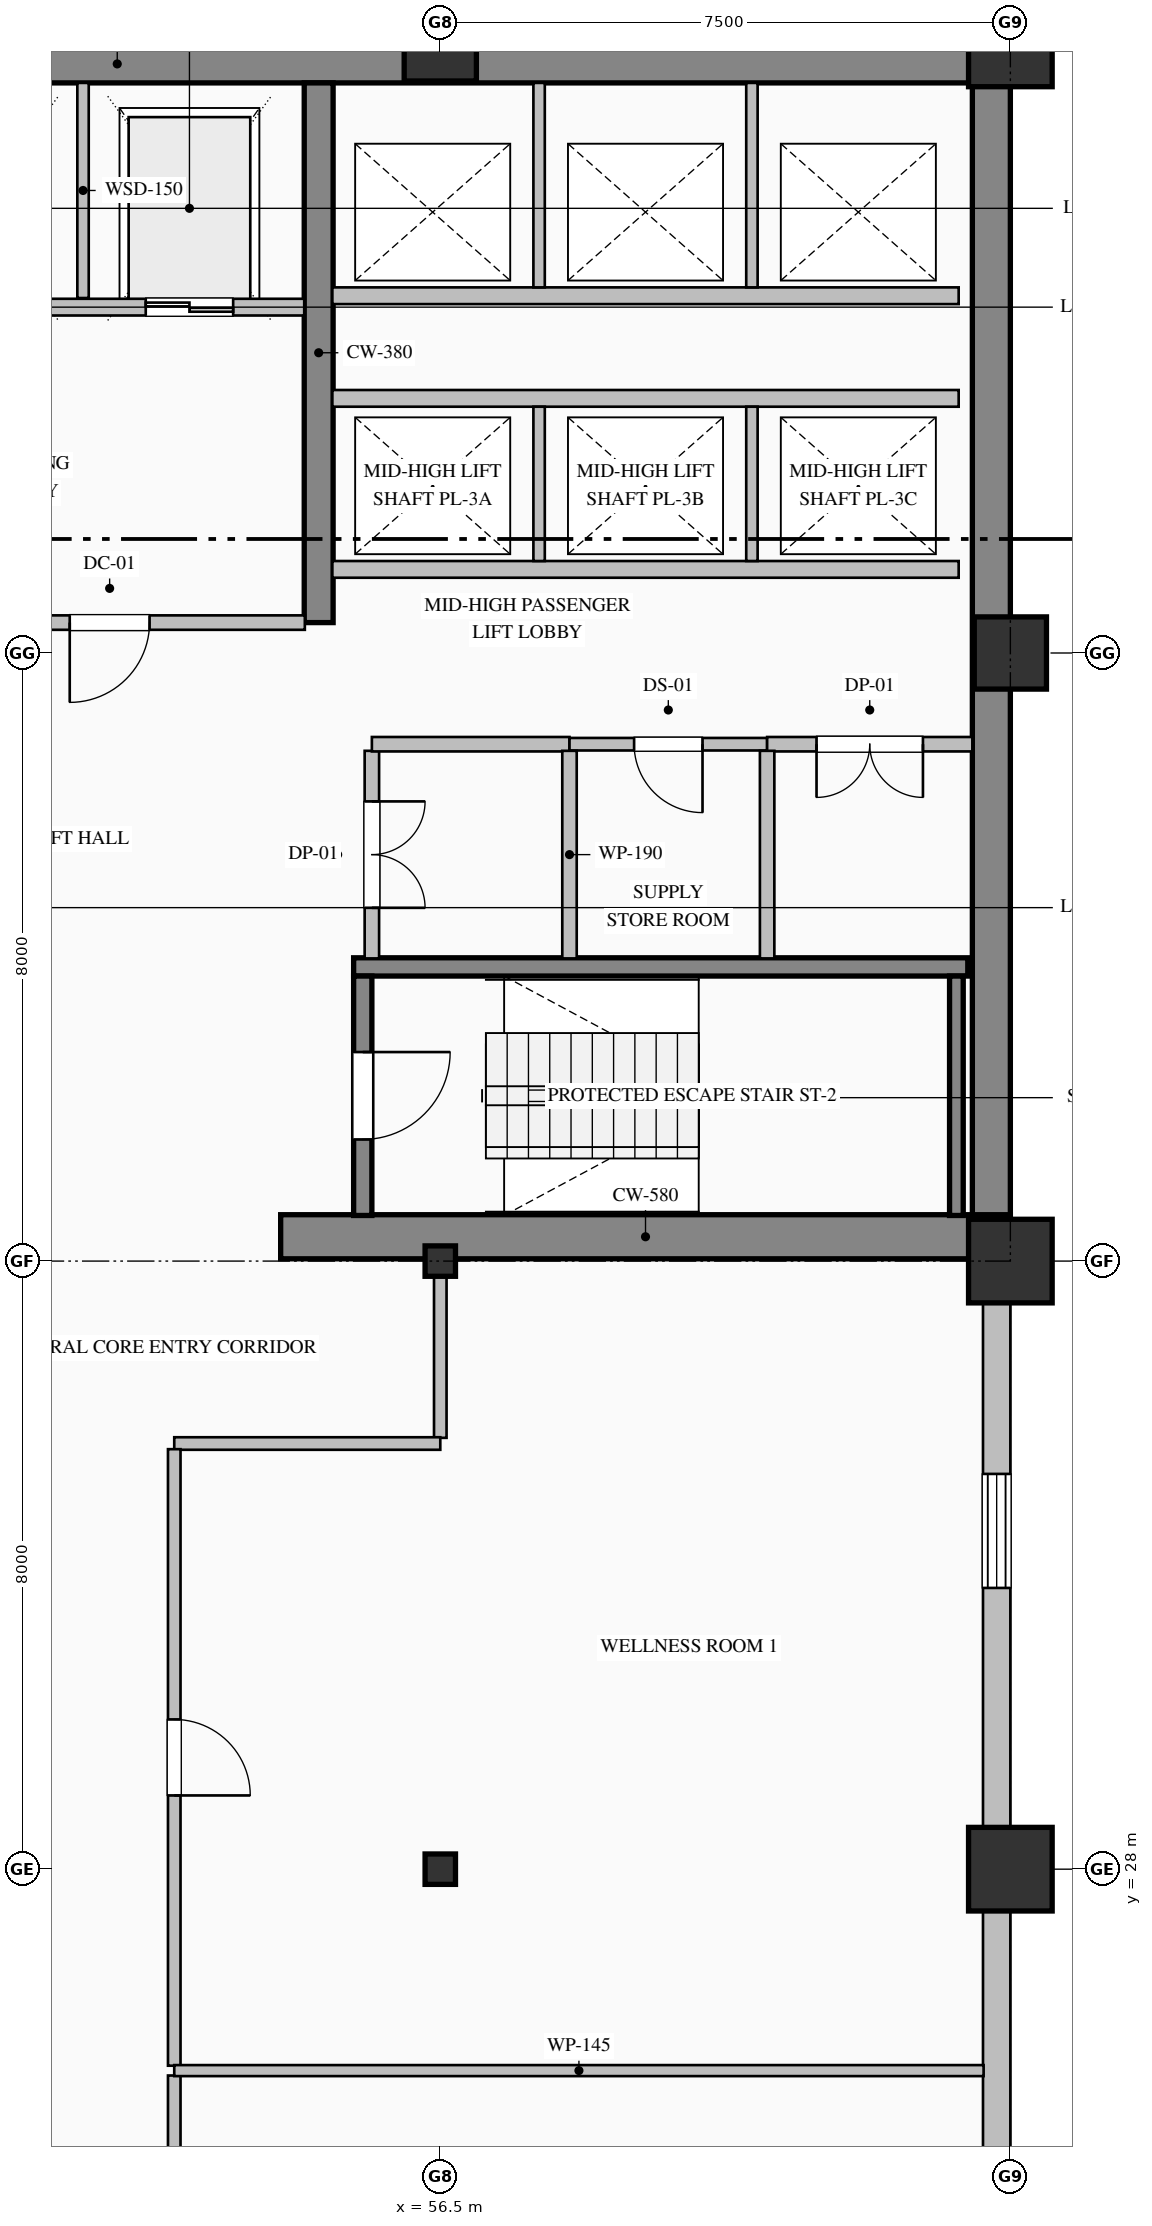
"""IFC4 building model, lengths in metres.
Left out: names, types, materials, properties, quantities, classifications, styles, units other than length and angle.
Written with IfcOpenShell. Run it as: python <this file> out.ifc"""

import sys

from ifc_helpers import new_model, si_unit, direction, frame, frame_2d, origin, origin_2d, place, context, subcontext, project, spatial, rectangle, hollow_rectangle, i_section, extrude, element, fill, save


model = new_model("IFC4")
c1 = context("Model", 3, precision=1e-05, world=origin(), true_north=direction((0.0, 1.0)))
c2 = subcontext(c1, "Body", "Model", "MODEL_VIEW")
j1 = project(units=[si_unit("LENGTHUNIT", "METRE"), si_unit("PLANEANGLEUNIT", "RADIAN")], contexts=[c1])
p1 = place(None, origin())
s1 = spatial("IfcSite", under=j1, at=p1, CompositionType="ELEMENT")
p2 = place(p1, origin())
s2 = spatial("IfcBuilding", under=s1, at=p2, CompositionType="ELEMENT")
p3 = place(p2, frame((0.0, 0.0, 175.0)))
s3 = spatial("IfcBuildingStorey", under=s2, at=p3, CompositionType="ELEMENT", Elevation=175.0)
p4 = place(p3, frame((40.5, 51.75, 0.0), z_axis=(0.0, 0.0, 1.0), x_axis=(1.0, 0.0, 0.0)))
e1 = element("IfcWall", 1, at=p4, inside=s3, PredefinedType="SHEAR", context=c2, shape_type="SweptSolid", body=[
    extrude(rectangle(XDim=23.5, YDim=0.5, at=frame_2d((11.75, 0.0))), origin(), (0.0, 0.0, 1.0), 3.765),
])
p5 = place(p3, frame((63.75, 36.32, 0.0), z_axis=(0.0, 0.0, 1.0), x_axis=(0.0, 1.0, 0.0)))
e2 = element("IfcWall", 2, at=p5, inside=s3, PredefinedType="SHEAR", context=c2, shape_type="SweptSolid", body=[
    extrude(rectangle(XDim=15.18, YDim=0.5, at=frame_2d((7.59, 0.0))), origin(), (0.0, 0.0, 1.0), 3.765),
])
p6 = place(p3, frame((54.4, 36.32, 0.0), z_axis=(0.0, 0.0, 1.0), x_axis=(1.0, 0.0, 0.0)))
e3 = element("IfcWall", 3, at=p6, inside=s3, PredefinedType="SHEAR", context=c2, shape_type="SweptSolid", body=[
    extrude(rectangle(XDim=9.6, YDim=0.58, at=frame_2d((4.8, 0.0))), origin(), (0.0, 0.0, 1.0), 4.0),
])
p7 = place(p3, frame((54.9, 44.4, 0.0), z_axis=(0.0, 0.0, 1.0), x_axis=(0.0, 1.0, 0.0)))
e4 = element("IfcWall", 4, at=p7, inside=s3, PredefinedType="SHEAR", context=c2, shape_type="SweptSolid", body=[
    extrude(rectangle(XDim=7.1, YDim=0.38, at=frame_2d((3.55, 0.0))), origin(), (0.0, 0.0, 1.0), 3.765),
])
for number, where, z_axis, x_axis in (
    (5, (56.5, 28.0, 0.0), (0.0, 0.0, 1.0), (1.0, 0.0, 0.0)),
    (6, (56.5, 36.0, 0.0), (0.0, 0.0, 1.0), (1.0, 0.0, 0.0)),
):
    element("IfcColumn", number, at=place(p3, frame(where, z_axis=z_axis, x_axis=x_axis)), inside=s3, PredefinedType="COLUMN", context=c2, shape_type="SweptSolid", body=[
        extrude(i_section(OverallWidth=0.4, OverallDepth=0.4, WebThickness=0.013, FlangeThickness=0.021, FilletRadius=0.022, at=origin_2d()), origin(), (0.0, 0.0, 1.0), 4.0),
    ])
p8 = place(p3, frame((56.5, 52.0, 0.0), z_axis=(0.0, 0.0, 1.0), x_axis=(1.0, 0.0, 0.0)))
e7 = element("IfcColumn", 7, at=p8, inside=s3, PredefinedType="COLUMN", context=c2, shape_type="SweptSolid", body=[
    extrude(hollow_rectangle(XDim=0.95, YDim=0.95, WallThickness=0.036, at=origin_2d()), origin(), (0.0, 0.0, 1.0), 4.0),
])
for number, where, z_axis, x_axis in (
    (8, (64.0, 28.0, 0.0), (0.0, 0.0, 1.0), (1.0, 0.0, 0.0)),
    (9, (64.0, 36.0, 0.0), (0.0, 0.0, 1.0), (1.0, 0.0, 0.0)),
):
    element("IfcColumn", number, at=place(p3, frame(where, z_axis=z_axis, x_axis=x_axis)), inside=s3, PredefinedType="COLUMN", context=c2, shape_type="SweptSolid", body=[
        extrude(hollow_rectangle(XDim=1.1, YDim=1.1, WallThickness=0.04, at=origin_2d()), origin(), (0.0, 0.0, 1.0), 4.0),
    ])
p9 = place(p3, frame((64.0, 44.0, 0.0), z_axis=(0.0, 0.0, 1.0), x_axis=(1.0, 0.0, 0.0)))
e10 = element("IfcColumn", 10, at=p9, inside=s3, PredefinedType="COLUMN", context=c2, shape_type="SweptSolid", body=[
    extrude(hollow_rectangle(XDim=0.95, YDim=0.95, WallThickness=0.036, at=origin_2d()), origin(), (0.0, 0.0, 1.0), 4.0),
])
p10 = place(p3, frame((64.0, 52.0, 0.0), z_axis=(0.0, 0.0, 1.0), x_axis=(1.0, 0.0, 0.0)))
e11 = element("IfcColumn", 11, at=p10, inside=s3, PredefinedType="COLUMN", context=c2, shape_type="SweptSolid", body=[
    extrude(hollow_rectangle(XDim=1.1, YDim=1.1, WallThickness=0.04, at=origin_2d()), origin(), (0.0, 0.0, 1.0), 4.0),
])
p11 = place(p3, frame((63.82, 36.05, 0.0), z_axis=(0.0, 0.0, 1.0), x_axis=(0.0, -1.0, 0.0)))
e12 = element("IfcWall", 12, at=p11, inside=s3, PredefinedType="SOLIDWALL", context=c2, shape_type="SweptSolid", body=[
    extrude(rectangle(XDim=28.05, YDim=0.36, at=frame_2d((14.025, 0.0))), origin(), (0.0, 0.0, 1.0), 3.265),
])
p12 = place(p11, frame((2.85, 0.0, 0.85)))
e13 = element("IfcOpeningElement", 13, at=p12, cuts=e12, PredefinedType="OPENING", context=c2, shape_type="SweptSolid", body=[
    extrude(rectangle(XDim=1.5, YDim=1.95, at=frame_2d((0.75, 0.975))), frame((0.0, 0.19, 0.0), z_axis=(0.0, -1.0, 0.0), x_axis=(1.0, 0.0, 0.0)), (0.0, 0.0, 1.0), 0.38),
])
p13 = place(p11, frame((13.65, 0.0, 0.85)))
e14 = element("IfcOpeningElement", 14, at=p13, cuts=e12, PredefinedType="OPENING", context=c2, shape_type="SweptSolid", body=[
    extrude(rectangle(XDim=1.5, YDim=1.95, at=frame_2d((0.75, 0.975))), frame((0.0, 0.19, 0.0), z_axis=(0.0, -1.0, 0.0), x_axis=(1.0, 0.0, 0.0)), (0.0, 0.0, 1.0), 0.38),
])
p14 = place(p11, frame((24.45, 0.0, 0.85)))
e15 = element("IfcOpeningElement", 15, at=p14, cuts=e12, PredefinedType="OPENING", context=c2, shape_type="SweptSolid", body=[
    extrude(rectangle(XDim=1.5, YDim=1.95, at=frame_2d((0.75, 0.975))), frame((0.0, 0.19, 0.0), z_axis=(0.0, -1.0, 0.0), x_axis=(1.0, 0.0, 0.0)), (0.0, 0.0, 1.0), 0.38),
])
p15 = place(p3, frame((55.36, 39.87, 0.0), z_axis=(0.0, 0.0, 1.0), x_axis=(1.0, 0.0, 0.0)))
e16 = element("IfcWall", 16, at=p15, inside=s3, PredefinedType="SOLIDWALL", context=c2, shape_type="SweptSolid", body=[
    extrude(rectangle(XDim=8.08, YDim=0.24, at=frame_2d((4.04, 0.0))), origin(), (0.0, 0.0, 1.0), 4.0),
])
p16 = place(p3, frame((55.48, 39.75, 0.0), z_axis=(0.0, 0.0, 1.0), x_axis=(0.0, -1.0, 0.0)))
e17 = element("IfcWall", 17, at=p16, inside=s3, PredefinedType="SOLIDWALL", context=c2, shape_type="SweptSolid", body=[
    extrude(rectangle(XDim=3.15, YDim=0.24, at=frame_2d((1.575, 0.0))), origin(), (0.0, 0.0, 1.0), 4.0),
])
p17 = place(p16, frame((1.0, 0.0, 0.0)))
e18 = element("IfcOpeningElement", 18, at=p17, cuts=e17, PredefinedType="OPENING", context=c2, shape_type="SweptSolid", body=[
    extrude(rectangle(XDim=1.15, YDim=2.2, at=frame_2d((0.575, 1.1))), frame((0.0, 0.13, 0.0), z_axis=(0.0, -1.0, 0.0), x_axis=(1.0, 0.0, 0.0)), (0.0, 0.0, 1.0), 0.26),
])
p18 = place(p3, frame((63.29, 36.6, 0.0), z_axis=(0.0, 0.0, 1.0), x_axis=(0.0, 1.0, 0.0)))
e19 = element("IfcWall", 19, at=p18, inside=s3, PredefinedType="SOLIDWALL", context=c2, shape_type="SweptSolid", body=[
    extrude(rectangle(XDim=3.15, YDim=0.18, at=frame_2d((1.575, 0.0))), origin(), (0.0, 0.0, 1.0), 4.0),
])
p19 = place(p3, frame((54.71, 48.55, 0.0), z_axis=(0.0, 0.0, 1.0), x_axis=(-1.0, 0.0, 0.0)))
e20 = element("IfcWall", 20, at=p19, inside=s3, PredefinedType="PARTITIONING", context=c2, shape_type="SweptSolid", body=[
    extrude(rectangle(XDim=5.12, YDim=0.22, at=frame_2d((2.56, 0.0))), origin(), (0.0, 0.0, 1.0), 3.765),
])
p20 = place(p19, frame((3.735, 0.0, 0.0)))
e21 = element("IfcOpeningElement", 21, at=p20, cuts=e20, PredefinedType="OPENING", context=c2, shape_type="SweptSolid", body=[
    extrude(rectangle(XDim=1.15, YDim=2.2, at=frame_2d((0.575, 1.1))), frame((0.0, 0.12, 0.0), z_axis=(0.0, -1.0, 0.0), x_axis=(1.0, 0.0, 0.0)), (0.0, 0.0, 1.0), 0.24),
])
p21 = place(p19, frame((0.935, 0.0, 0.0)))
e22 = element("IfcOpeningElement", 22, at=p21, cuts=e20, PredefinedType="OPENING", context=c2, shape_type="SweptSolid", body=[
    extrude(rectangle(XDim=1.15, YDim=2.2, at=frame_2d((0.575, 1.1))), frame((0.0, 0.12, 0.0), z_axis=(0.0, -1.0, 0.0), x_axis=(1.0, 0.0, 0.0)), (0.0, 0.0, 1.0), 0.24),
])
p22 = place(p3, frame((51.8, 48.67, 0.0), z_axis=(0.0, 0.0, 1.0), x_axis=(0.0, 1.0, 0.0)))
e23 = element("IfcWall", 23, at=p22, inside=s3, PredefinedType="PARTITIONING", context=c2, shape_type="SweptSolid", body=[
    extrude(rectangle(XDim=2.83, YDim=0.15, at=frame_2d((1.415, 0.0))), origin(), (0.0, 0.0, 1.0), 3.765),
])
for number, where, z_axis, x_axis in (
    (24, (63.32, 45.1, 0.0), (0.0, 0.0, 1.0), (-1.0, 0.0, 0.0)),
    (25, (55.08, 47.35, 0.0), (0.0, 0.0, 1.0), (1.0, 0.0, 0.0)),
):
    element("IfcWall", number, at=place(p3, frame(where, z_axis=z_axis, x_axis=x_axis)), inside=s3, PredefinedType="PARTITIONING", context=c2, shape_type="SweptSolid", body=[
        extrude(rectangle(XDim=8.24, YDim=0.22, at=frame_2d((4.12, 0.0))), origin(), (0.0, 0.0, 1.0), 3.765),
    ])
for number, where, z_axis, x_axis in (
    (26, (57.8, 45.21, 0.0), (0.0, 0.0, 1.0), (0.0, 1.0, 0.0)),
    (27, (60.6, 45.21, 0.0), (0.0, 0.0, 1.0), (0.0, 1.0, 0.0)),
):
    element("IfcWall", number, at=place(p3, frame(where, z_axis=z_axis, x_axis=x_axis)), inside=s3, PredefinedType="PARTITIONING", context=c2, shape_type="SweptSolid", body=[
        extrude(rectangle(XDim=2.03, YDim=0.15, at=frame_2d((1.015, 0.0))), origin(), (0.0, 0.0, 1.0), 3.765),
    ])
p23 = place(p3, frame((63.32, 48.7, 0.0), z_axis=(0.0, 0.0, 1.0), x_axis=(-1.0, 0.0, 0.0)))
e28 = element("IfcWall", 28, at=p23, inside=s3, PredefinedType="PARTITIONING", context=c2, shape_type="SweptSolid", body=[
    extrude(rectangle(XDim=8.24, YDim=0.22, at=frame_2d((4.12, 0.0))), origin(), (0.0, 0.0, 1.0), 3.765),
])
for number, where, z_axis, x_axis in (
    (29, (57.8, 48.81, 0.0), (0.0, 0.0, 1.0), (0.0, 1.0, 0.0)),
    (30, (60.6, 48.81, 0.0), (0.0, 0.0, 1.0), (0.0, 1.0, 0.0)),
):
    element("IfcWall", number, at=place(p3, frame(where, z_axis=z_axis, x_axis=x_axis)), inside=s3, PredefinedType="PARTITIONING", context=c2, shape_type="SweptSolid", body=[
        extrude(rectangle(XDim=2.69, YDim=0.15, at=frame_2d((1.345, 0.0))), origin(), (0.0, 0.0, 1.0), 3.765),
    ])
p24 = place(p3, frame((54.718, 44.4, 0.0), z_axis=(0.0, 0.0, 1.0), x_axis=(-1.0, 0.0, 0.0)))
e31 = element("IfcWall", 31, at=p24, inside=s3, PredefinedType="PARTITIONING", context=c2, shape_type="SweptSolid", body=[
    extrude(rectangle(XDim=5.136, YDim=0.19, at=frame_2d((2.568, 0.0))), origin(), (0.0, 0.0, 1.0), 3.765),
])
p25 = place(p24, frame((2.043, 0.0, 0.0)))
e32 = element("IfcOpeningElement", 32, at=p25, cuts=e31, PredefinedType="OPENING", context=c2, shape_type="SweptSolid", body=[
    extrude(rectangle(XDim=1.05, YDim=2.15, at=frame_2d((0.525, 1.075))), frame((0.0, 0.105, 0.0), z_axis=(0.0, -1.0, 0.0), x_axis=(1.0, 0.0, 0.0)), (0.0, 0.0, 1.0), 0.21),
])
p26 = place(p3, frame((55.6, 42.713, 0.0), z_axis=(0.0, 0.0, 1.0), x_axis=(0.0, -1.0, 0.0)))
e33 = element("IfcWall", 33, at=p26, inside=s3, PredefinedType="PARTITIONING", context=c2, shape_type="SweptSolid", body=[
    extrude(rectangle(XDim=2.731, YDim=0.19, at=frame_2d((1.365, 0.0))), origin(), (0.0, 0.0, 1.0), 3.765),
])
p27 = place(p26, frame((0.666, 0.0, 0.0)))
e34 = element("IfcOpeningElement", 34, at=p27, cuts=e33, PredefinedType="OPENING", context=c2, shape_type="SweptSolid", body=[
    extrude(rectangle(XDim=1.4, YDim=2.25, at=frame_2d((0.7, 1.125))), frame((0.0, 0.105, 0.0), z_axis=(0.0, -1.0, 0.0), x_axis=(1.0, 0.0, 0.0)), (0.0, 0.0, 1.0), 0.21),
])
p28 = place(p3, frame((58.2, 42.8, 0.0), z_axis=(0.0, 0.0, 1.0), x_axis=(-1.0, 0.0, 0.0)))
e35 = element("IfcWall", 35, at=p28, inside=s3, PredefinedType="PARTITIONING", context=c2, shape_type="SweptSolid", body=[
    extrude(rectangle(XDim=2.6, YDim=0.19, at=frame_2d((1.3, 0.0))), origin(), (0.0, 0.0, 1.0), 3.765),
])
p29 = place(p3, frame((60.8, 42.8, 0.0), z_axis=(0.0, 0.0, 1.0), x_axis=(-1.0, 0.0, 0.0)))
e36 = element("IfcWall", 36, at=p29, inside=s3, PredefinedType="PARTITIONING", context=c2, shape_type="SweptSolid", body=[
    extrude(rectangle(XDim=2.6, YDim=0.165, at=frame_2d((1.3, 0.0))), origin(), (0.0, 0.0, 1.0), 3.765),
])
p30 = place(p29, frame((0.85, 0.0, 0.0)))
e37 = element("IfcOpeningElement", 37, at=p30, cuts=e36, PredefinedType="OPENING", context=c2, shape_type="SweptSolid", body=[
    extrude(rectangle(XDim=0.9, YDim=2.15, at=frame_2d((0.45, 1.075))), frame((0.0, 0.093, 0.0), z_axis=(0.0, -1.0, 0.0), x_axis=(1.0, 0.0, 0.0)), (0.0, 0.0, 1.0), 0.185),
])
p31 = place(p3, frame((63.5, 42.8, 0.0), z_axis=(0.0, 0.0, 1.0), x_axis=(-1.0, 0.0, 0.0)))
e38 = element("IfcWall", 38, at=p31, inside=s3, PredefinedType="PARTITIONING", context=c2, shape_type="SweptSolid", body=[
    extrude(rectangle(XDim=2.7, YDim=0.19, at=frame_2d((1.35, 0.0))), origin(), (0.0, 0.0, 1.0), 3.765),
])
p32 = place(p31, frame((0.65, 0.0, 0.0)))
e39 = element("IfcOpeningElement", 39, at=p32, cuts=e38, PredefinedType="OPENING", context=c2, shape_type="SweptSolid", body=[
    extrude(rectangle(XDim=1.4, YDim=2.25, at=frame_2d((0.7, 1.125))), frame((0.0, 0.105, 0.0), z_axis=(0.0, -1.0, 0.0), x_axis=(1.0, 0.0, 0.0)), (0.0, 0.0, 1.0), 0.21),
])
for number, where, z_axis, x_axis in (
    (40, (58.2, 42.713, 0.0), (0.0, 0.0, 1.0), (0.0, -1.0, 0.0)),
    (41, (60.8, 42.713, 0.0), (0.0, 0.0, 1.0), (0.0, -1.0, 0.0)),
):
    element("IfcWall", number, at=place(p3, frame(where, z_axis=z_axis, x_axis=x_axis)), inside=s3, PredefinedType="PARTITIONING", context=c2, shape_type="SweptSolid", body=[
        extrude(rectangle(XDim=2.731, YDim=0.19, at=frame_2d((1.365, 0.0))), origin(), (0.0, 0.0, 1.0), 3.765),
    ])
p33 = place(p3, frame((56.5, 36.0, 0.0), z_axis=(0.0, 0.0, 1.0), x_axis=(0.0, -1.0, 0.0)))
e42 = element("IfcWall", 42, at=p33, inside=s3, PredefinedType="PARTITIONING", context=c2, shape_type="SweptSolid", body=[
    extrude(rectangle(XDim=2.325, YDim=0.165, at=frame_2d((1.163, 0.0))), origin(), (0.0, 0.0, 1.0), 3.157),
])
p34 = place(p3, frame((56.5, 33.6, 0.0), z_axis=(0.0, 0.0, 1.0), x_axis=(-1.0, 0.0, 0.0)))
e43 = element("IfcWall", 43, at=p34, inside=s3, PredefinedType="PARTITIONING", context=c2, shape_type="SweptSolid", body=[
    extrude(rectangle(XDim=3.5, YDim=0.165, at=frame_2d((1.75, 0.0))), origin(), (0.0, 0.0, 1.0), 3.765),
])
p35 = place(p3, frame((53.0, 25.285, 0.0), z_axis=(0.0, 0.0, 1.0), x_axis=(0.0, -1.0, 0.0)))
e44 = element("IfcWall", 44, at=p35, inside=s3, PredefinedType="PARTITIONING", context=c2, shape_type="SweptSolid", body=[
    extrude(rectangle(XDim=10.511, YDim=0.165, at=frame_2d((5.255, 0.0))), origin(), (0.0, 0.0, 1.0), 3.765),
])
p36 = place(p35, frame((4.756, 0.0, 0.0)))
e45 = element("IfcOpeningElement", 45, at=p36, cuts=e44, PredefinedType="OPENING", context=c2, shape_type="SweptSolid", body=[
    extrude(rectangle(XDim=1.0, YDim=2.15, at=frame_2d((0.5, 1.075))), frame((0.0, 0.093, 0.0), z_axis=(0.0, -1.0, 0.0), x_axis=(1.0, 0.0, 0.0)), (0.0, 0.0, 1.0), 0.185),
])
p37 = place(p3, frame((53.0, 33.525, 0.0), z_axis=(0.0, 0.0, 1.0), x_axis=(0.0, -1.0, 0.0)))
e46 = element("IfcWall", 46, at=p37, inside=s3, PredefinedType="PARTITIONING", context=c2, shape_type="SweptSolid", body=[
    extrude(rectangle(XDim=8.111, YDim=0.165, at=frame_2d((4.055, 0.0))), origin(), (0.0, 0.0, 1.0), 3.765),
])
p38 = place(p37, frame((3.555, 0.0, 0.0)))
e47 = element("IfcOpeningElement", 47, at=p38, cuts=e46, PredefinedType="OPENING", context=c2, shape_type="SweptSolid", body=[
    extrude(rectangle(XDim=1.0, YDim=2.15, at=frame_2d((0.5, 1.075))), frame((0.0, 0.093, 0.0), z_axis=(0.0, -1.0, 0.0), x_axis=(1.0, 0.0, 0.0)), (0.0, 0.0, 1.0), 0.185),
])
p39 = place(p3, frame((53.0, 25.35, 0.0), z_axis=(0.0, 0.0, 1.0), x_axis=(1.0, 0.0, 0.0)))
e48 = element("IfcWall", 48, at=p39, inside=s3, PredefinedType="PARTITIONING", context=c2, shape_type="SweptSolid", body=[
    extrude(rectangle(XDim=10.648, YDim=0.145, at=frame_2d((5.324, 0.0))), origin(), (0.0, 0.0, 1.0), 3.765),
])
p40 = place(p12, origin())
e49 = element("IfcWindow", 49, at=p40, inside=s3, PartitioningType="DOUBLE_PANEL_VERTICAL", PredefinedType="WINDOW", context=c2, shape_type="SweptSolid", body=[
    extrude(rectangle(XDim=1.5, YDim=1.95, at=frame_2d((0.75, 0.975))), frame((0.0, 0.15, 0.0), z_axis=(0.0, -1.0, 0.0), x_axis=(1.0, 0.0, 0.0)), (0.0, 0.0, 1.0), 0.06),
])
fill(e13, e49)
p41 = place(p17, origin())
e50 = element("IfcDoor", 50, at=p41, inside=s3, OperationType="SINGLE_SWING_LEFT", PredefinedType="DOOR", context=c2, shape_type="SweptSolid", body=[
    extrude(rectangle(XDim=1.15, YDim=2.2, at=frame_2d((0.575, 1.1))), frame((0.0, 0.025, 0.0), z_axis=(0.0, -1.0, 0.0), x_axis=(1.0, 0.0, 0.0)), (0.0, 0.0, 1.0), 0.05),
])
fill(e18, e50)
p42 = place(p21, origin())
e51 = element("IfcDoor", 51, at=p42, inside=s3, OperationType="DOUBLE_DOOR_SLIDING", PredefinedType="DOOR", context=c2, shape_type="SweptSolid", body=[
    extrude(rectangle(XDim=1.15, YDim=2.2, at=frame_2d((0.575, 1.1))), frame((0.0, 0.025, 0.0), z_axis=(0.0, -1.0, 0.0), x_axis=(1.0, 0.0, 0.0)), (0.0, 0.0, 1.0), 0.05),
])
fill(e22, e51)
p43 = place(p25, origin())
e52 = element("IfcDoor", 52, at=p43, inside=s3, OperationType="SINGLE_SWING_RIGHT", PredefinedType="DOOR", context=c2, shape_type="SweptSolid", body=[
    extrude(rectangle(XDim=1.05, YDim=2.15, at=frame_2d((0.525, 1.075))), frame((0.0, 0.025, 0.0), z_axis=(0.0, -1.0, 0.0), x_axis=(1.0, 0.0, 0.0)), (0.0, 0.0, 1.0), 0.05),
])
fill(e32, e52)
p44 = place(p27, origin())
e53 = element("IfcDoor", 53, at=p44, inside=s3, OperationType="DOUBLE_DOOR_SINGLE_SWING", PredefinedType="DOOR", context=c2, shape_type="SweptSolid", body=[
    extrude(rectangle(XDim=1.4, YDim=2.25, at=frame_2d((0.7, 1.125))), frame((0.0, 0.025, 0.0), z_axis=(0.0, -1.0, 0.0), x_axis=(1.0, 0.0, 0.0)), (0.0, 0.0, 1.0), 0.05),
])
fill(e34, e53)
p45 = place(p30, origin())
e54 = element("IfcDoor", 54, at=p45, inside=s3, OperationType="SINGLE_SWING_LEFT", PredefinedType="DOOR", context=c2, shape_type="SweptSolid", body=[
    extrude(rectangle(XDim=0.9, YDim=2.15, at=frame_2d((0.45, 1.075))), frame((0.0, 0.025, 0.0), z_axis=(0.0, -1.0, 0.0), x_axis=(1.0, 0.0, 0.0)), (0.0, 0.0, 1.0), 0.05),
])
fill(e37, e54)
p46 = place(p32, origin())
e55 = element("IfcDoor", 55, at=p46, inside=s3, OperationType="DOUBLE_DOOR_SINGLE_SWING", PredefinedType="DOOR", context=c2, shape_type="SweptSolid", body=[
    extrude(rectangle(XDim=1.4, YDim=2.25, at=frame_2d((0.7, 1.125))), frame((0.0, 0.025, 0.0), z_axis=(0.0, -1.0, 0.0), x_axis=(1.0, 0.0, 0.0)), (0.0, 0.0, 1.0), 0.05),
])
fill(e39, e55)
p47 = place(p38, origin())
e56 = element("IfcDoor", 56, at=p47, inside=s3, OperationType="SINGLE_SWING_RIGHT", PredefinedType="DOOR", context=c2, shape_type="SweptSolid", body=[
    extrude(rectangle(XDim=1.0, YDim=2.15, at=frame_2d((0.5, 1.075))), frame((0.0, 0.025, 0.0), z_axis=(0.0, -1.0, 0.0), x_axis=(1.0, 0.0, 0.0)), (0.0, 0.0, 1.0), 0.05),
])
fill(e47, e56)
save(model, sys.argv[1])
